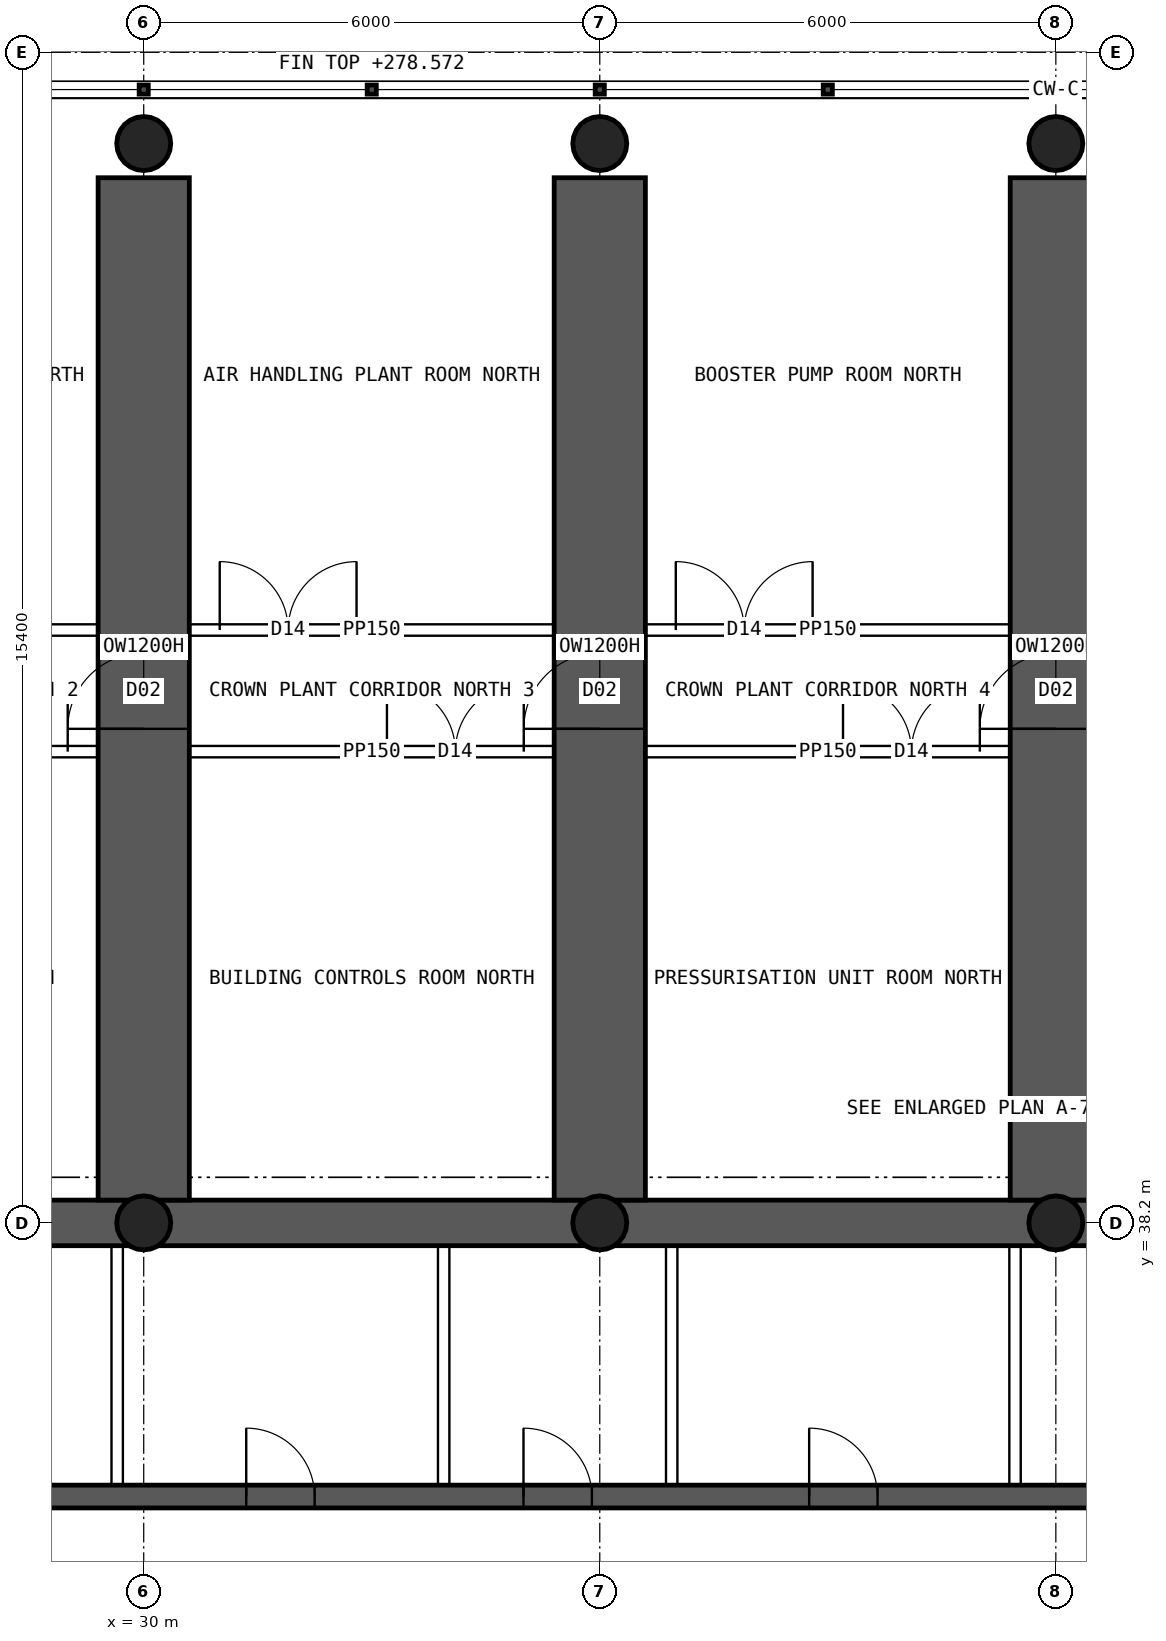
"""IFC4 building model, lengths in metres.
Left out: names, types, materials, properties, quantities, classifications, styles, units other than length and angle.
Written with IfcOpenShell. Run it as: python <this file> out.ifc"""

import sys

from ifc_helpers import new_model, si_unit, direction, frame, frame_2d, origin, origin_2d, place, context, subcontext, project, spatial, rectangle, hollow_circle, extrude, element, fill, save


model = new_model("IFC4")
c1 = context("Model", 3, precision=1e-05, world=origin(), true_north=direction((0.0, 1.0)))
c2 = subcontext(c1, "Body", "Model", "MODEL_VIEW")
j1 = project(units=[si_unit("LENGTHUNIT", "METRE"), si_unit("PLANEANGLEUNIT", "RADIAN")], contexts=[c1])
p1 = place(None, origin())
s1 = spatial("IfcSite", under=j1, at=p1, CompositionType="ELEMENT")
p2 = place(p1, origin())
s2 = spatial("IfcBuilding", under=s1, at=p2, CompositionType="ELEMENT")
p3 = place(p2, frame((0.0, 0.0, 262.3)))
s3 = spatial("IfcBuildingStorey", under=s2, at=p3, CompositionType="ELEMENT", Elevation=262.3)
p4 = place(p3, frame((18.0, 38.2, 0.0), z_axis=(0.0, 0.0, 1.0), x_axis=(1.0, 0.0, 0.0)))
e1 = element("IfcWall", 1, at=p4, inside=s3, PredefinedType="SHEAR", context=c2, shape_type="SweptSolid", body=[
    extrude(rectangle(XDim=48.0, YDim=0.6, at=frame_2d((24.0, 0.0))), origin(), (0.0, 0.0, 1.0), 6.0),
])
p5 = place(p3, frame((18.3, 34.6, 0.0), z_axis=(0.0, 0.0, 1.0), x_axis=(1.0, 0.0, 0.0)))
e2 = element("IfcWall", 2, at=p5, inside=s3, PredefinedType="SHEAR", context=c2, shape_type="SweptSolid", body=[
    extrude(rectangle(XDim=47.4, YDim=0.3, at=frame_2d((23.7, 0.0))), origin(), (0.0, 0.0, 1.0), 6.0),
])
p6 = place(p5, frame((0.9, 0.0, 0.0)))
e3 = element("IfcOpeningElement", 3, at=p6, cuts=e2, PredefinedType="OPENING", context=c2, shape_type="SweptSolid", body=[
    extrude(rectangle(XDim=1.1, YDim=2.1, at=frame_2d((0.55, 1.05))), frame((0.0, 0.16, 0.0), z_axis=(0.0, -1.0, 0.0), x_axis=(1.0, 0.0, 0.0)), (0.0, 0.0, 1.0), 0.32),
])
p7 = place(p5, frame((45.4, 0.0, 0.0)))
e4 = element("IfcOpeningElement", 4, at=p7, cuts=e2, PredefinedType="OPENING", context=c2, shape_type="SweptSolid", body=[
    extrude(rectangle(XDim=1.1, YDim=2.1, at=frame_2d((0.55, 1.05))), frame((0.0, 0.16, 0.0), z_axis=(0.0, -1.0, 0.0), x_axis=(1.0, 0.0, 0.0)), (0.0, 0.0, 1.0), 0.32),
])
p8 = place(p5, frame((4.3, 0.0, 0.0)))
e5 = element("IfcOpeningElement", 5, at=p8, cuts=e2, PredefinedType="OPENING", context=c2, shape_type="SweptSolid", body=[
    extrude(rectangle(XDim=0.9, YDim=2.1, at=frame_2d((0.45, 1.05))), frame((0.0, 0.16, 0.0), z_axis=(0.0, -1.0, 0.0), x_axis=(1.0, 0.0, 0.0)), (0.0, 0.0, 1.0), 0.32),
])
p9 = place(p5, frame((42.2, 0.0, 0.0)))
e6 = element("IfcOpeningElement", 6, at=p9, cuts=e2, PredefinedType="OPENING", context=c2, shape_type="SweptSolid", body=[
    extrude(rectangle(XDim=0.9, YDim=2.1, at=frame_2d((0.45, 1.05))), frame((0.0, 0.16, 0.0), z_axis=(0.0, -1.0, 0.0), x_axis=(1.0, 0.0, 0.0)), (0.0, 0.0, 1.0), 0.32),
])
p10 = place(p5, frame((9.075, 0.0, 0.0)))
e7 = element("IfcOpeningElement", 7, at=p10, cuts=e2, PredefinedType="OPENING", context=c2, shape_type="SweptSolid", body=[
    extrude(rectangle(XDim=0.9, YDim=2.1, at=frame_2d((0.45, 1.05))), frame((0.0, 0.16, 0.0), z_axis=(0.0, -1.0, 0.0), x_axis=(1.0, 0.0, 0.0)), (0.0, 0.0, 1.0), 0.32),
])
p11 = place(p5, frame((13.049, 0.0, 0.0)))
e8 = element("IfcOpeningElement", 8, at=p11, cuts=e2, PredefinedType="OPENING", context=c2, shape_type="SweptSolid", body=[
    extrude(rectangle(XDim=0.9, YDim=2.1, at=frame_2d((0.45, 1.05))), frame((0.0, 0.16, 0.0), z_axis=(0.0, -1.0, 0.0), x_axis=(1.0, 0.0, 0.0)), (0.0, 0.0, 1.0), 0.32),
])
p12 = place(p5, frame((16.696, 0.0, 0.0)))
e9 = element("IfcOpeningElement", 9, at=p12, cuts=e2, PredefinedType="OPENING", context=c2, shape_type="SweptSolid", body=[
    extrude(rectangle(XDim=0.9, YDim=2.1, at=frame_2d((0.45, 1.05))), frame((0.0, 0.16, 0.0), z_axis=(0.0, -1.0, 0.0), x_axis=(1.0, 0.0, 0.0)), (0.0, 0.0, 1.0), 0.32),
])
p13 = place(p5, frame((20.455, 0.0, 0.0)))
e10 = element("IfcOpeningElement", 10, at=p13, cuts=e2, PredefinedType="OPENING", context=c2, shape_type="SweptSolid", body=[
    extrude(rectangle(XDim=0.9, YDim=2.1, at=frame_2d((0.45, 1.05))), frame((0.0, 0.16, 0.0), z_axis=(0.0, -1.0, 0.0), x_axis=(1.0, 0.0, 0.0)), (0.0, 0.0, 1.0), 0.32),
])
p14 = place(p5, frame((24.861, 0.0, 0.0)))
e11 = element("IfcOpeningElement", 11, at=p14, cuts=e2, PredefinedType="OPENING", context=c2, shape_type="SweptSolid", body=[
    extrude(rectangle(XDim=0.9, YDim=2.1, at=frame_2d((0.45, 1.05))), frame((0.0, 0.16, 0.0), z_axis=(0.0, -1.0, 0.0), x_axis=(1.0, 0.0, 0.0)), (0.0, 0.0, 1.0), 0.32),
])
p15 = place(p5, frame((27.658, 0.0, 0.0)))
e12 = element("IfcOpeningElement", 12, at=p15, cuts=e2, PredefinedType="OPENING", context=c2, shape_type="SweptSolid", body=[
    extrude(rectangle(XDim=0.9, YDim=2.1, at=frame_2d((0.45, 1.05))), frame((0.0, 0.16, 0.0), z_axis=(0.0, -1.0, 0.0), x_axis=(1.0, 0.0, 0.0)), (0.0, 0.0, 1.0), 0.32),
])
p16 = place(p5, frame((30.031, 0.0, 0.0)))
e13 = element("IfcOpeningElement", 13, at=p16, cuts=e2, PredefinedType="OPENING", context=c2, shape_type="SweptSolid", body=[
    extrude(rectangle(XDim=0.9, YDim=2.1, at=frame_2d((0.45, 1.05))), frame((0.0, 0.16, 0.0), z_axis=(0.0, -1.0, 0.0), x_axis=(1.0, 0.0, 0.0)), (0.0, 0.0, 1.0), 0.32),
])
p17 = place(p5, frame((33.881, 0.0, 0.0)))
e14 = element("IfcOpeningElement", 14, at=p17, cuts=e2, PredefinedType="OPENING", context=c2, shape_type="SweptSolid", body=[
    extrude(rectangle(XDim=0.9, YDim=2.1, at=frame_2d((0.45, 1.05))), frame((0.0, 0.16, 0.0), z_axis=(0.0, -1.0, 0.0), x_axis=(1.0, 0.0, 0.0)), (0.0, 0.0, 1.0), 0.32),
])
p18 = place(p5, frame((37.629, 0.0, 0.0)))
e15 = element("IfcOpeningElement", 15, at=p18, cuts=e2, PredefinedType="OPENING", context=c2, shape_type="SweptSolid", body=[
    extrude(rectangle(XDim=0.9, YDim=2.1, at=frame_2d((0.45, 1.05))), frame((0.0, 0.16, 0.0), z_axis=(0.0, -1.0, 0.0), x_axis=(1.0, 0.0, 0.0)), (0.0, 0.0, 1.0), 0.32),
])
p19 = place(p3, frame((30.0, 38.5, 0.0), z_axis=(0.0, 0.0, 1.0), x_axis=(0.0, 1.0, 0.0)))
e16 = element("IfcWall", 16, at=p19, inside=s3, PredefinedType="SHEAR", context=c2, shape_type="SweptSolid", body=[
    extrude(rectangle(XDim=13.45, YDim=1.2, at=frame_2d((6.725, 0.0))), origin(), (0.0, 0.0, 1.0), 4.4),
])
p20 = place(p19, frame((6.2, 0.0, 0.0)))
e17 = element("IfcOpeningElement", 17, at=p20, cuts=e16, PredefinedType="OPENING", context=c2, shape_type="SweptSolid", body=[
    extrude(rectangle(XDim=1.0, YDim=2.1, at=frame_2d((0.5, 1.05))), frame((0.0, 0.61, 0.0), z_axis=(0.0, -1.0, 0.0), x_axis=(1.0, 0.0, 0.0)), (0.0, 0.0, 1.0), 1.22),
])
p21 = place(p3, frame((36.0, 38.5, 0.0), z_axis=(0.0, 0.0, 1.0), x_axis=(0.0, 1.0, 0.0)))
e18 = element("IfcWall", 18, at=p21, inside=s3, PredefinedType="SHEAR", context=c2, shape_type="SweptSolid", body=[
    extrude(rectangle(XDim=13.45, YDim=1.2, at=frame_2d((6.725, 0.0))), origin(), (0.0, 0.0, 1.0), 4.4),
])
p22 = place(p21, frame((6.2, 0.0, 0.0)))
e19 = element("IfcOpeningElement", 19, at=p22, cuts=e18, PredefinedType="OPENING", context=c2, shape_type="SweptSolid", body=[
    extrude(rectangle(XDim=1.0, YDim=2.1, at=frame_2d((0.5, 1.05))), frame((0.0, 0.61, 0.0), z_axis=(0.0, -1.0, 0.0), x_axis=(1.0, 0.0, 0.0)), (0.0, 0.0, 1.0), 1.22),
])
p23 = place(p3, frame((42.0, 38.5, 0.0), z_axis=(0.0, 0.0, 1.0), x_axis=(0.0, 1.0, 0.0)))
e20 = element("IfcWall", 20, at=p23, inside=s3, PredefinedType="SHEAR", context=c2, shape_type="SweptSolid", body=[
    extrude(rectangle(XDim=13.45, YDim=1.2, at=frame_2d((6.725, 0.0))), origin(), (0.0, 0.0, 1.0), 4.4),
])
p24 = place(p23, frame((6.2, 0.0, 0.0)))
e21 = element("IfcOpeningElement", 21, at=p24, cuts=e20, PredefinedType="OPENING", context=c2, shape_type="SweptSolid", body=[
    extrude(rectangle(XDim=1.0, YDim=2.1, at=frame_2d((0.5, 1.05))), frame((0.0, 0.61, 0.0), z_axis=(0.0, -1.0, 0.0), x_axis=(1.0, 0.0, 0.0)), (0.0, 0.0, 1.0), 1.22),
])
p25 = place(p3, frame((30.0, 38.2, 0.0), z_axis=(0.0, 0.0, 1.0), x_axis=(1.0, 0.0, 0.0)))
e22 = element("IfcColumn", 22, at=p25, inside=s3, PredefinedType="COLUMN", context=c2, shape_type="SweptSolid", body=[
    extrude(hollow_circle(Radius=0.355, WallThickness=0.025, at=origin_2d()), origin(), (0.0, 0.0, 1.0), 11.517),
])
p26 = place(p3, frame((30.0, 52.4, 0.0), z_axis=(0.0, 0.0, 1.0), x_axis=(1.0, 0.0, 0.0)))
e23 = element("IfcColumn", 23, at=p26, inside=s3, PredefinedType="COLUMN", context=c2, shape_type="SweptSolid", body=[
    extrude(hollow_circle(Radius=0.355, WallThickness=0.025, at=origin_2d()), origin(), (0.0, 0.0, 1.0), 15.058),
])
p27 = place(p3, frame((36.0, 38.2, 0.0), z_axis=(0.0, 0.0, 1.0), x_axis=(1.0, 0.0, 0.0)))
e24 = element("IfcColumn", 24, at=p27, inside=s3, PredefinedType="COLUMN", context=c2, shape_type="SweptSolid", body=[
    extrude(hollow_circle(Radius=0.355, WallThickness=0.025, at=origin_2d()), origin(), (0.0, 0.0, 1.0), 11.517),
])
p28 = place(p3, frame((36.0, 52.4, 0.0), z_axis=(0.0, 0.0, 1.0), x_axis=(1.0, 0.0, 0.0)))
e25 = element("IfcColumn", 25, at=p28, inside=s3, PredefinedType="COLUMN", context=c2, shape_type="SweptSolid", body=[
    extrude(hollow_circle(Radius=0.355, WallThickness=0.025, at=origin_2d()), origin(), (0.0, 0.0, 1.0), 15.058),
])
p29 = place(p3, frame((42.0, 38.2, 0.0), z_axis=(0.0, 0.0, 1.0), x_axis=(1.0, 0.0, 0.0)))
e26 = element("IfcColumn", 26, at=p29, inside=s3, PredefinedType="COLUMN", context=c2, shape_type="SweptSolid", body=[
    extrude(hollow_circle(Radius=0.355, WallThickness=0.025, at=origin_2d()), origin(), (0.0, 0.0, 1.0), 11.517),
])
p30 = place(p3, frame((42.0, 52.4, 0.0), z_axis=(0.0, 0.0, 1.0), x_axis=(1.0, 0.0, 0.0)))
e27 = element("IfcColumn", 27, at=p30, inside=s3, PredefinedType="COLUMN", context=c2, shape_type="SweptSolid", body=[
    extrude(hollow_circle(Radius=0.355, WallThickness=0.025, at=origin_2d()), origin(), (0.0, 0.0, 1.0), 15.058),
])
for number, where, z_axis, x_axis in (
    (28, (29.651, 34.75, 0.0), (0.0, 0.0, 1.0), (0.0, 1.0, 0.0)),
    (29, (33.946, 34.75, 0.0), (0.0, 0.0, 1.0), (0.0, 1.0, 0.0)),
    (30, (36.946, 34.75, 0.0), (0.0, 0.0, 1.0), (0.0, 1.0, 0.0)),
    (31, (41.463, 34.75, 0.0), (0.0, 0.0, 1.0), (0.0, 1.0, 0.0)),
):
    element("IfcWall", number, at=place(p3, frame(where, z_axis=z_axis, x_axis=x_axis)), inside=s3, PredefinedType="SOLIDWALL", context=c2, shape_type="SweptSolid", body=[
        extrude(rectangle(XDim=3.15, YDim=0.15, at=frame_2d((1.575, 0.0))), origin(), (0.0, 0.0, 1.0), 6.0),
    ])
p31 = place(p3, frame((24.6, 46.0, 0.0), z_axis=(0.0, 0.0, 1.0), x_axis=(1.0, 0.0, 0.0)))
e32 = element("IfcWall", 32, at=p31, inside=s3, PredefinedType="PARTITIONING", context=c2, shape_type="SweptSolid", body=[
    extrude(rectangle(XDim=4.8, YDim=0.15, at=frame_2d((2.4, 0.0))), origin(), (0.0, 0.0, 1.0), 6.0),
])
p32 = place(p31, frame((0.4, 0.0, 0.0)))
e33 = element("IfcOpeningElement", 33, at=p32, cuts=e32, PredefinedType="OPENING", context=c2, shape_type="SweptSolid", body=[
    extrude(rectangle(XDim=1.8, YDim=2.4, at=frame_2d((0.9, 1.2))), frame((0.0, 0.085, 0.0), z_axis=(0.0, -1.0, 0.0), x_axis=(1.0, 0.0, 0.0)), (0.0, 0.0, 1.0), 0.17),
])
p33 = place(p3, frame((24.6, 44.4, 0.0), z_axis=(0.0, 0.0, 1.0), x_axis=(1.0, 0.0, 0.0)))
e34 = element("IfcWall", 34, at=p33, inside=s3, PredefinedType="PARTITIONING", context=c2, shape_type="SweptSolid", body=[
    extrude(rectangle(XDim=4.8, YDim=0.15, at=frame_2d((2.4, 0.0))), origin(), (0.0, 0.0, 1.0), 6.0),
])
p34 = place(p33, frame((2.6, 0.0, 0.0)))
e35 = element("IfcOpeningElement", 35, at=p34, cuts=e34, PredefinedType="OPENING", context=c2, shape_type="SweptSolid", body=[
    extrude(rectangle(XDim=1.8, YDim=2.4, at=frame_2d((0.9, 1.2))), frame((0.0, 0.085, 0.0), z_axis=(0.0, -1.0, 0.0), x_axis=(1.0, 0.0, 0.0)), (0.0, 0.0, 1.0), 0.17),
])
p35 = place(p3, frame((30.6, 46.0, 0.0), z_axis=(0.0, 0.0, 1.0), x_axis=(1.0, 0.0, 0.0)))
e36 = element("IfcWall", 36, at=p35, inside=s3, PredefinedType="PARTITIONING", context=c2, shape_type="SweptSolid", body=[
    extrude(rectangle(XDim=4.8, YDim=0.15, at=frame_2d((2.4, 0.0))), origin(), (0.0, 0.0, 1.0), 6.0),
])
p36 = place(p35, frame((0.4, 0.0, 0.0)))
e37 = element("IfcOpeningElement", 37, at=p36, cuts=e36, PredefinedType="OPENING", context=c2, shape_type="SweptSolid", body=[
    extrude(rectangle(XDim=1.8, YDim=2.4, at=frame_2d((0.9, 1.2))), frame((0.0, 0.085, 0.0), z_axis=(0.0, -1.0, 0.0), x_axis=(1.0, 0.0, 0.0)), (0.0, 0.0, 1.0), 0.17),
])
p37 = place(p3, frame((30.6, 44.4, 0.0), z_axis=(0.0, 0.0, 1.0), x_axis=(1.0, 0.0, 0.0)))
e38 = element("IfcWall", 38, at=p37, inside=s3, PredefinedType="PARTITIONING", context=c2, shape_type="SweptSolid", body=[
    extrude(rectangle(XDim=4.8, YDim=0.15, at=frame_2d((2.4, 0.0))), origin(), (0.0, 0.0, 1.0), 6.0),
])
p38 = place(p37, frame((2.6, 0.0, 0.0)))
e39 = element("IfcOpeningElement", 39, at=p38, cuts=e38, PredefinedType="OPENING", context=c2, shape_type="SweptSolid", body=[
    extrude(rectangle(XDim=1.8, YDim=2.4, at=frame_2d((0.9, 1.2))), frame((0.0, 0.085, 0.0), z_axis=(0.0, -1.0, 0.0), x_axis=(1.0, 0.0, 0.0)), (0.0, 0.0, 1.0), 0.17),
])
p39 = place(p3, frame((36.6, 46.0, 0.0), z_axis=(0.0, 0.0, 1.0), x_axis=(1.0, 0.0, 0.0)))
e40 = element("IfcWall", 40, at=p39, inside=s3, PredefinedType="PARTITIONING", context=c2, shape_type="SweptSolid", body=[
    extrude(rectangle(XDim=4.8, YDim=0.15, at=frame_2d((2.4, 0.0))), origin(), (0.0, 0.0, 1.0), 6.0),
])
p40 = place(p39, frame((0.4, 0.0, 0.0)))
e41 = element("IfcOpeningElement", 41, at=p40, cuts=e40, PredefinedType="OPENING", context=c2, shape_type="SweptSolid", body=[
    extrude(rectangle(XDim=1.8, YDim=2.4, at=frame_2d((0.9, 1.2))), frame((0.0, 0.085, 0.0), z_axis=(0.0, -1.0, 0.0), x_axis=(1.0, 0.0, 0.0)), (0.0, 0.0, 1.0), 0.17),
])
p41 = place(p3, frame((36.6, 44.4, 0.0), z_axis=(0.0, 0.0, 1.0), x_axis=(1.0, 0.0, 0.0)))
e42 = element("IfcWall", 42, at=p41, inside=s3, PredefinedType="PARTITIONING", context=c2, shape_type="SweptSolid", body=[
    extrude(rectangle(XDim=4.8, YDim=0.15, at=frame_2d((2.4, 0.0))), origin(), (0.0, 0.0, 1.0), 6.0),
])
p42 = place(p41, frame((2.6, 0.0, 0.0)))
e43 = element("IfcOpeningElement", 43, at=p42, cuts=e42, PredefinedType="OPENING", context=c2, shape_type="SweptSolid", body=[
    extrude(rectangle(XDim=1.8, YDim=2.4, at=frame_2d((0.9, 1.2))), frame((0.0, 0.085, 0.0), z_axis=(0.0, -1.0, 0.0), x_axis=(1.0, 0.0, 0.0)), (0.0, 0.0, 1.0), 0.17),
])
p43 = place(p11, origin())
e44 = element("IfcDoor", 44, at=p43, inside=s3, OperationType="SINGLE_SWING_LEFT", PredefinedType="DOOR", context=c2, shape_type="SweptSolid", body=[
    extrude(rectangle(XDim=0.9, YDim=2.1, at=frame_2d((0.45, 1.05))), frame((0.0, 0.025, 0.0), z_axis=(0.0, -1.0, 0.0), x_axis=(1.0, 0.0, 0.0)), (0.0, 0.0, 1.0), 0.05),
])
fill(e8, e44)
p44 = place(p12, origin())
e45 = element("IfcDoor", 45, at=p44, inside=s3, OperationType="SINGLE_SWING_LEFT", PredefinedType="DOOR", context=c2, shape_type="SweptSolid", body=[
    extrude(rectangle(XDim=0.9, YDim=2.1, at=frame_2d((0.45, 1.05))), frame((0.0, 0.025, 0.0), z_axis=(0.0, -1.0, 0.0), x_axis=(1.0, 0.0, 0.0)), (0.0, 0.0, 1.0), 0.05),
])
fill(e9, e45)
p45 = place(p13, origin())
e46 = element("IfcDoor", 46, at=p45, inside=s3, OperationType="SINGLE_SWING_LEFT", PredefinedType="DOOR", context=c2, shape_type="SweptSolid", body=[
    extrude(rectangle(XDim=0.9, YDim=2.1, at=frame_2d((0.45, 1.05))), frame((0.0, 0.025, 0.0), z_axis=(0.0, -1.0, 0.0), x_axis=(1.0, 0.0, 0.0)), (0.0, 0.0, 1.0), 0.05),
])
fill(e10, e46)
p46 = place(p20, origin())
e47 = element("IfcDoor", 47, at=p46, inside=s3, OperationType="SINGLE_SWING_LEFT", PredefinedType="DOOR", context=c2, shape_type="SweptSolid", body=[
    extrude(rectangle(XDim=1.0, YDim=2.1, at=frame_2d((0.5, 1.05))), frame((0.0, 0.025, 0.0), z_axis=(0.0, -1.0, 0.0), x_axis=(1.0, 0.0, 0.0)), (0.0, 0.0, 1.0), 0.05),
])
fill(e17, e47)
p47 = place(p22, origin())
e48 = element("IfcDoor", 48, at=p47, inside=s3, OperationType="SINGLE_SWING_LEFT", PredefinedType="DOOR", context=c2, shape_type="SweptSolid", body=[
    extrude(rectangle(XDim=1.0, YDim=2.1, at=frame_2d((0.5, 1.05))), frame((0.0, 0.025, 0.0), z_axis=(0.0, -1.0, 0.0), x_axis=(1.0, 0.0, 0.0)), (0.0, 0.0, 1.0), 0.05),
])
fill(e19, e48)
p48 = place(p24, origin())
e49 = element("IfcDoor", 49, at=p48, inside=s3, OperationType="SINGLE_SWING_LEFT", PredefinedType="DOOR", context=c2, shape_type="SweptSolid", body=[
    extrude(rectangle(XDim=1.0, YDim=2.1, at=frame_2d((0.5, 1.05))), frame((0.0, 0.025, 0.0), z_axis=(0.0, -1.0, 0.0), x_axis=(1.0, 0.0, 0.0)), (0.0, 0.0, 1.0), 0.05),
])
fill(e21, e49)
p49 = place(p34, origin())
e50 = element("IfcDoor", 50, at=p49, inside=s3, OperationType="DOUBLE_DOOR_SINGLE_SWING", PredefinedType="DOOR", context=c2, shape_type="SweptSolid", body=[
    extrude(rectangle(XDim=1.8, YDim=2.4, at=frame_2d((0.9, 1.2))), frame((0.0, 0.025, 0.0), z_axis=(0.0, -1.0, 0.0), x_axis=(1.0, 0.0, 0.0)), (0.0, 0.0, 1.0), 0.05),
])
fill(e35, e50)
p50 = place(p36, origin())
e51 = element("IfcDoor", 51, at=p50, inside=s3, OperationType="DOUBLE_DOOR_SINGLE_SWING", PredefinedType="DOOR", context=c2, shape_type="SweptSolid", body=[
    extrude(rectangle(XDim=1.8, YDim=2.4, at=frame_2d((0.9, 1.2))), frame((0.0, 0.025, 0.0), z_axis=(0.0, -1.0, 0.0), x_axis=(1.0, 0.0, 0.0)), (0.0, 0.0, 1.0), 0.05),
])
fill(e37, e51)
p51 = place(p38, origin())
e52 = element("IfcDoor", 52, at=p51, inside=s3, OperationType="DOUBLE_DOOR_SINGLE_SWING", PredefinedType="DOOR", context=c2, shape_type="SweptSolid", body=[
    extrude(rectangle(XDim=1.8, YDim=2.4, at=frame_2d((0.9, 1.2))), frame((0.0, 0.025, 0.0), z_axis=(0.0, -1.0, 0.0), x_axis=(1.0, 0.0, 0.0)), (0.0, 0.0, 1.0), 0.05),
])
fill(e39, e52)
p52 = place(p40, origin())
e53 = element("IfcDoor", 53, at=p52, inside=s3, OperationType="DOUBLE_DOOR_SINGLE_SWING", PredefinedType="DOOR", context=c2, shape_type="SweptSolid", body=[
    extrude(rectangle(XDim=1.8, YDim=2.4, at=frame_2d((0.9, 1.2))), frame((0.0, 0.025, 0.0), z_axis=(0.0, -1.0, 0.0), x_axis=(1.0, 0.0, 0.0)), (0.0, 0.0, 1.0), 0.05),
])
fill(e41, e53)
p53 = place(p42, origin())
e54 = element("IfcDoor", 54, at=p53, inside=s3, OperationType="DOUBLE_DOOR_SINGLE_SWING", PredefinedType="DOOR", context=c2, shape_type="SweptSolid", body=[
    extrude(rectangle(XDim=1.8, YDim=2.4, at=frame_2d((0.9, 1.2))), frame((0.0, 0.025, 0.0), z_axis=(0.0, -1.0, 0.0), x_axis=(1.0, 0.0, 0.0)), (0.0, 0.0, 1.0), 0.05),
])
fill(e43, e54)
save(model, sys.argv[1])
